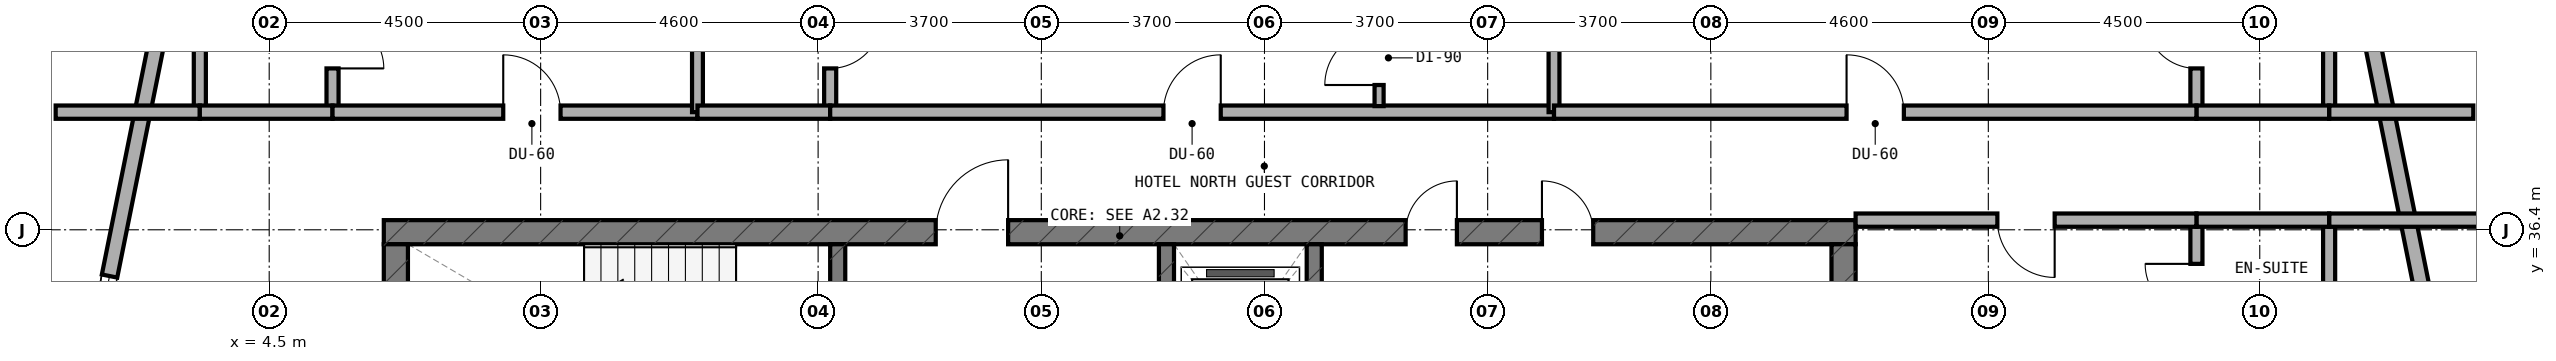
"""IFC4 building model, lengths in metres.
Left out: names, types, materials, properties, quantities, classifications, styles, units other than length and angle.
Written with IfcOpenShell. Run it as: python <this file> out.ifc"""

import sys

from ifc_helpers import new_model, si_unit, direction, frame, frame_2d, origin, place, context, subcontext, project, spatial, rectangle, extrude, element, fill, save


model = new_model("IFC4")
c1 = context("Model", 3, precision=1e-05, world=origin(), true_north=direction((0.0, 1.0)))
c2 = subcontext(c1, "Body", "Model", "MODEL_VIEW")
j1 = project(units=[si_unit("LENGTHUNIT", "METRE"), si_unit("PLANEANGLEUNIT", "RADIAN")], contexts=[c1])
p1 = place(None, origin())
s1 = spatial("IfcSite", under=j1, at=p1, CompositionType="ELEMENT")
p2 = place(p1, origin())
s2 = spatial("IfcBuilding", under=s1, at=p2, CompositionType="ELEMENT")
p3 = place(p2, frame((0.0, 0.0, 138.0)))
s3 = spatial("IfcBuildingStorey", under=s2, at=p3, CompositionType="ELEMENT", Elevation=138.0)
p4 = place(p3, frame((6.4, 36.36, 0.0), z_axis=(0.0, 0.0, 1.0), x_axis=(1.0, 0.0, 0.0)))
e1 = element("IfcWall", 1, at=p4, inside=s3, PredefinedType="SHEAR", context=c2, shape_type="SweptSolid", body=[
    extrude(rectangle(XDim=24.4, YDim=0.4, at=frame_2d((12.2, 0.0))), origin(), (0.0, 0.0, 1.0), 3.5),
])
p5 = place(p4, frame((9.15, 0.0, 0.0)))
e2 = element("IfcOpeningElement", 2, at=p5, cuts=e1, PredefinedType="OPENING", context=c2, shape_type="SweptSolid", body=[
    extrude(rectangle(XDim=1.2, YDim=2.15, at=frame_2d((0.6, 1.075))), frame((0.0, 0.21, 0.0), z_axis=(0.0, -1.0, 0.0), x_axis=(1.0, 0.0, 0.0)), (0.0, 0.0, 1.0), 0.42),
])
p6 = place(p4, frame((19.2, 0.0, 0.0)))
e3 = element("IfcOpeningElement", 3, at=p6, cuts=e1, PredefinedType="OPENING", context=c2, shape_type="SweptSolid", body=[
    extrude(rectangle(XDim=0.85, YDim=2.1, at=frame_2d((0.425, 1.05))), frame((0.0, 0.21, 0.0), z_axis=(0.0, -1.0, 0.0), x_axis=(1.0, 0.0, 0.0)), (0.0, 0.0, 1.0), 0.42),
])
p7 = place(p4, frame((16.94, 0.0, 0.0)))
e4 = element("IfcOpeningElement", 4, at=p7, cuts=e1, PredefinedType="OPENING", context=c2, shape_type="SweptSolid", body=[
    extrude(rectangle(XDim=0.85, YDim=2.1, at=frame_2d((0.425, 1.05))), frame((0.0, 0.21, 0.0), z_axis=(0.0, -1.0, 0.0), x_axis=(1.0, 0.0, 0.0)), (0.0, 0.0, 1.0), 0.42),
])
for number, where, z_axis, x_axis in (
    (5, (6.6, 33.0, 0.0), (0.0, 0.0, 1.0), (0.0, 1.0, 0.0)),
    (6, (30.6, 33.0, 0.0), (0.0, 0.0, 1.0), (0.0, 1.0, 0.0)),
):
    element("IfcWall", number, at=place(p3, frame(where, z_axis=z_axis, x_axis=x_axis)), inside=s3, PredefinedType="SHEAR", context=c2, shape_type="SweptSolid", body=[
        extrude(rectangle(XDim=3.16, YDim=0.4, at=frame_2d((1.58, 0.0))), origin(), (0.0, 0.0, 1.0), 3.5),
    ])
p8 = place(p3, frame((13.925, 33.0, 0.0), z_axis=(0.0, 0.0, 1.0), x_axis=(0.0, 1.0, 0.0)))
e7 = element("IfcWall", 7, at=p8, inside=s3, PredefinedType="STANDARD", context=c2, shape_type="SweptSolid", body=[
    extrude(rectangle(XDim=3.16, YDim=0.25, at=frame_2d((1.58, 0.0))), origin(), (0.0, 0.0, 1.0), 3.22),
])
p9 = place(p8, frame((0.98, 0.0, 0.0)))
e8 = element("IfcOpeningElement", 8, at=p9, cuts=e7, PredefinedType="OPENING", context=c2, shape_type="SweptSolid", body=[
    extrude(rectangle(XDim=1.1, YDim=2.15, at=frame_2d((0.55, 1.075))), frame((0.0, 0.135, 0.0), z_axis=(0.0, -1.0, 0.0), x_axis=(1.0, 0.0, 0.0)), (0.0, 0.0, 1.0), 0.27),
])
p10 = place(p3, frame((19.375, 33.0, 0.0), z_axis=(0.0, 0.0, 1.0), x_axis=(0.0, 1.0, 0.0)))
e9 = element("IfcWall", 9, at=p10, inside=s3, PredefinedType="STANDARD", context=c2, shape_type="SweptSolid", body=[
    extrude(rectangle(XDim=3.16, YDim=0.25, at=frame_2d((1.58, 0.0))), origin(), (0.0, 0.0, 1.0), 3.22),
])
p11 = place(p10, frame((0.98, 0.0, 0.0)))
e10 = element("IfcOpeningElement", 10, at=p11, cuts=e9, PredefinedType="OPENING", context=c2, shape_type="SweptSolid", body=[
    extrude(rectangle(XDim=1.1, YDim=2.15, at=frame_2d((0.55, 1.075))), frame((0.0, 0.135, 0.0), z_axis=(0.0, -1.0, 0.0), x_axis=(1.0, 0.0, 0.0)), (0.0, 0.0, 1.0), 0.27),
])
p12 = place(p3, frame((21.825, 33.0, 0.0), z_axis=(0.0, 0.0, 1.0), x_axis=(0.0, 1.0, 0.0)))
e11 = element("IfcWall", 11, at=p12, inside=s3, PredefinedType="STANDARD", context=c2, shape_type="SweptSolid", body=[
    extrude(rectangle(XDim=3.16, YDim=0.25, at=frame_2d((1.58, 0.0))), origin(), (0.0, 0.0, 1.0), 3.22),
])
p13 = place(p3, frame((41.084, 30.98, 0.0), z_axis=(0.0, 0.0, 1.0), x_axis=(-0.197435082048, 0.980315963543, 0.0)))
e12 = element("IfcWall", 12, at=p13, inside=s3, PredefinedType="STANDARD", context=c2, shape_type="SweptSolid", body=[
    extrude(rectangle(XDim=9.183, YDim=0.26, at=frame_2d((4.591, 0.0))), origin(), (0.0, 0.0, 1.0), 3.22),
])
p14 = place(p13, frame((1.734, 0.0, 0.85)))
e13 = element("IfcOpeningElement", 13, at=p14, cuts=e12, PredefinedType="OPENING", context=c2, shape_type="SweptSolid", body=[
    extrude(rectangle(XDim=2.1, YDim=1.5, at=frame_2d((1.05, 0.75))), frame((0.0, 0.14, 0.0), z_axis=(0.0, -1.0, 0.0), x_axis=(1.0, 0.0, 0.0)), (0.0, 0.0, 1.0), 0.28),
])
p15 = place(p3, frame((2.729, 39.982, 0.0), z_axis=(0.0, 0.0, 1.0), x_axis=(-0.197435082048, -0.980315963543, 0.0)))
e14 = element("IfcWall", 14, at=p15, inside=s3, PredefinedType="STANDARD", context=c2, shape_type="SweptSolid", body=[
    extrude(rectangle(XDim=9.183, YDim=0.26, at=frame_2d((4.591, 0.0))), origin(), (0.0, 0.0, 1.0), 3.22),
])
p16 = place(p15, frame((4.436, 0.0, 0.85)))
e15 = element("IfcOpeningElement", 15, at=p16, cuts=e14, PredefinedType="OPENING", context=c2, shape_type="SweptSolid", body=[
    extrude(rectangle(XDim=2.1, YDim=1.5, at=frame_2d((1.05, 0.75))), frame((0.0, 0.14, 0.0), z_axis=(0.0, -1.0, 0.0), x_axis=(1.0, 0.0, 0.0)), (0.0, 0.0, 1.0), 0.28),
])
p17 = place(p3, frame((5.55, 38.45, 0.0), z_axis=(0.0, 0.0, 1.0), x_axis=(0.0, 1.0, 0.0)))
e16 = element("IfcWall", 16, at=p17, inside=s3, PredefinedType="PLUMBINGWALL", context=c2, shape_type="SweptSolid", body=[
    extrude(rectangle(XDim=2.1, YDim=0.2, at=frame_2d((1.05, 0.0))), origin(), (0.0, 0.0, 1.0), 3.22),
])
p18 = place(p17, frame((0.625, 0.0, 0.0)))
e17 = element("IfcOpeningElement", 17, at=p18, cuts=e16, PredefinedType="OPENING", context=c2, shape_type="SweptSolid", body=[
    extrude(rectangle(XDim=0.85, YDim=2.1, at=frame_2d((0.425, 1.05))), frame((0.0, 0.11, 0.0), z_axis=(0.0, -1.0, 0.0), x_axis=(1.0, 0.0, 0.0)), (0.0, 0.0, 1.0), 0.22),
])
p19 = place(p3, frame((3.35, 38.45, 0.0), z_axis=(0.0, 0.0, 1.0), x_axis=(0.0, 1.0, 0.0)))
e18 = element("IfcWall", 18, at=p19, inside=s3, PredefinedType="PLUMBINGWALL", context=c2, shape_type="SweptSolid", body=[
    extrude(rectangle(XDim=2.1, YDim=0.2, at=frame_2d((1.05, 0.0))), origin(), (0.0, 0.0, 1.0), 3.22),
])
p20 = place(p3, frame((0.96, 38.35, 0.0), z_axis=(0.0, 0.0, 1.0), x_axis=(1.0, 0.0, 0.0)))
e19 = element("IfcWall", 19, at=p20, inside=s3, PredefinedType="SOLIDWALL", context=c2, shape_type="SweptSolid", body=[
    extrude(rectangle(XDim=2.39, YDim=0.22, at=frame_2d((1.195, 0.0))), origin(), (0.0, 0.0, 1.0), 3.22),
])
p21 = place(p3, frame((3.35, 38.35, 0.0), z_axis=(0.0, 0.0, 1.0), x_axis=(1.0, 0.0, 0.0)))
e20 = element("IfcWall", 20, at=p21, inside=s3, PredefinedType="SOLIDWALL", context=c2, shape_type="SweptSolid", body=[
    extrude(rectangle(XDim=2.2, YDim=0.22, at=frame_2d((1.1, 0.0))), origin(), (0.0, 0.0, 1.0), 3.22),
])
p22 = place(p3, frame((5.55, 38.35, 0.0), z_axis=(0.0, 0.0, 1.0), x_axis=(1.0, 0.0, 0.0)))
e21 = element("IfcWall", 21, at=p22, inside=s3, PredefinedType="SOLIDWALL", context=c2, shape_type="SweptSolid", body=[
    extrude(rectangle(XDim=6.05, YDim=0.22, at=frame_2d((3.025, 0.0))), origin(), (0.0, 0.0, 1.0), 2.695),
])
p23 = place(p22, frame((2.83, 0.0, 0.0)))
e22 = element("IfcOpeningElement", 22, at=p23, cuts=e21, PredefinedType="OPENING", context=c2, shape_type="SweptSolid", body=[
    extrude(rectangle(XDim=0.95, YDim=2.1, at=frame_2d((0.475, 1.05))), frame((0.0, 0.12, 0.0), z_axis=(0.0, -1.0, 0.0), x_axis=(1.0, 0.0, 0.0)), (0.0, 0.0, 1.0), 0.24),
])
p24 = place(p3, frame((11.6, 38.35, 0.0), z_axis=(0.0, 0.0, 1.0), x_axis=(0.0, 1.0, 0.0)))
e23 = element("IfcWall", 23, at=p24, inside=s3, PredefinedType="SOLIDWALL", context=c2, shape_type="SweptSolid", body=[
    extrude(rectangle(XDim=6.116, YDim=0.18, at=frame_2d((3.058, 0.0))), origin(), (0.0, 0.0, 1.0), 2.835),
])
p25 = place(p3, frame((13.8, 38.45, 0.0), z_axis=(0.0, 0.0, 1.0), x_axis=(0.0, 1.0, 0.0)))
e24 = element("IfcWall", 24, at=p25, inside=s3, PredefinedType="PLUMBINGWALL", context=c2, shape_type="SweptSolid", body=[
    extrude(rectangle(XDim=2.1, YDim=0.2, at=frame_2d((1.05, 0.0))), origin(), (0.0, 0.0, 1.0), 2.835),
])
p26 = place(p25, frame((0.625, 0.0, 0.0)))
e25 = element("IfcOpeningElement", 25, at=p26, cuts=e24, PredefinedType="OPENING", context=c2, shape_type="SweptSolid", body=[
    extrude(rectangle(XDim=0.85, YDim=2.1, at=frame_2d((0.425, 1.05))), frame((0.0, 0.11, 0.0), z_axis=(0.0, -1.0, 0.0), x_axis=(1.0, 0.0, 0.0)), (0.0, 0.0, 1.0), 0.22),
])
p27 = place(p3, frame((11.6, 38.35, 0.0), z_axis=(0.0, 0.0, 1.0), x_axis=(1.0, 0.0, 0.0)))
e26 = element("IfcWall", 26, at=p27, inside=s3, PredefinedType="SOLIDWALL", context=c2, shape_type="SweptSolid", body=[
    extrude(rectangle(XDim=2.2, YDim=0.22, at=frame_2d((1.1, 0.0))), origin(), (0.0, 0.0, 1.0), 3.22),
])
p28 = place(p3, frame((13.8, 38.35, 0.0), z_axis=(0.0, 0.0, 1.0), x_axis=(1.0, 0.0, 0.0)))
e27 = element("IfcWall", 27, at=p28, inside=s3, PredefinedType="SOLIDWALL", context=c2, shape_type="SweptSolid", body=[
    extrude(rectangle(XDim=12.0, YDim=0.22, at=frame_2d((6.0, 0.0))), origin(), (0.0, 0.0, 1.0), 2.695),
])
p29 = place(p28, frame((5.525, 0.0, 0.0)))
e28 = element("IfcOpeningElement", 28, at=p29, cuts=e27, PredefinedType="OPENING", context=c2, shape_type="SweptSolid", body=[
    extrude(rectangle(XDim=0.95, YDim=2.1, at=frame_2d((0.475, 1.05))), frame((0.0, 0.12, 0.0), z_axis=(0.0, -1.0, 0.0), x_axis=(1.0, 0.0, 0.0)), (0.0, 0.0, 1.0), 0.24),
])
p30 = place(p3, frame((22.9, 38.45, 0.0), z_axis=(0.0, 0.0, 1.0), x_axis=(0.0, 1.0, 0.0)))
e29 = element("IfcWall", 29, at=p30, inside=s3, PredefinedType="PARTITIONING", context=c2, shape_type="SweptSolid", body=[
    extrude(rectangle(XDim=6.59, YDim=0.15, at=frame_2d((3.295, 0.0))), origin(), (0.0, 0.0, 1.0), 2.835),
])
p31 = place(p30, frame((0.35, 0.0, 0.0)))
e30 = element("IfcOpeningElement", 30, at=p31, cuts=e29, PredefinedType="OPENING", context=c2, shape_type="SweptSolid", body=[
    extrude(rectangle(XDim=0.9, YDim=2.1, at=frame_2d((0.45, 1.05))), frame((0.0, 0.085, 0.0), z_axis=(0.0, -1.0, 0.0), x_axis=(1.0, 0.0, 0.0)), (0.0, 0.0, 1.0), 0.17),
])
p32 = place(p3, frame((25.8, 38.35, 0.0), z_axis=(0.0, 0.0, 1.0), x_axis=(0.0, 1.0, 0.0)))
e31 = element("IfcWall", 31, at=p32, inside=s3, PredefinedType="SOLIDWALL", context=c2, shape_type="SweptSolid", body=[
    extrude(rectangle(XDim=6.79, YDim=0.18, at=frame_2d((3.395, 0.0))), origin(), (0.0, 0.0, 1.0), 2.695),
])
p33 = place(p3, frame((36.45, 38.45, 0.0), z_axis=(0.0, 0.0, 1.0), x_axis=(0.0, 1.0, 0.0)))
e32 = element("IfcWall", 32, at=p33, inside=s3, PredefinedType="PLUMBINGWALL", context=c2, shape_type="SweptSolid", body=[
    extrude(rectangle(XDim=2.1, YDim=0.2, at=frame_2d((1.05, 0.0))), origin(), (0.0, 0.0, 1.0), 3.22),
])
p34 = place(p33, frame((0.625, 0.0, 0.0)))
e33 = element("IfcOpeningElement", 33, at=p34, cuts=e32, PredefinedType="OPENING", context=c2, shape_type="SweptSolid", body=[
    extrude(rectangle(XDim=0.85, YDim=2.1, at=frame_2d((0.425, 1.05))), frame((0.0, 0.11, 0.0), z_axis=(0.0, -1.0, 0.0), x_axis=(1.0, 0.0, 0.0)), (0.0, 0.0, 1.0), 0.22),
])
p35 = place(p3, frame((38.65, 38.45, 0.0), z_axis=(0.0, 0.0, 1.0), x_axis=(0.0, 1.0, 0.0)))
e34 = element("IfcWall", 34, at=p35, inside=s3, PredefinedType="PLUMBINGWALL", context=c2, shape_type="SweptSolid", body=[
    extrude(rectangle(XDim=2.1, YDim=0.2, at=frame_2d((1.05, 0.0))), origin(), (0.0, 0.0, 1.0), 3.22),
])
p36 = place(p3, frame((38.65, 38.35, 0.0), z_axis=(0.0, 0.0, 1.0), x_axis=(1.0, 0.0, 0.0)))
e35 = element("IfcWall", 35, at=p36, inside=s3, PredefinedType="SOLIDWALL", context=c2, shape_type="SweptSolid", body=[
    extrude(rectangle(XDim=2.39, YDim=0.22, at=frame_2d((1.195, 0.0))), origin(), (0.0, 0.0, 1.0), 3.22),
])
p37 = place(p3, frame((36.45, 38.35, 0.0), z_axis=(0.0, 0.0, 1.0), x_axis=(1.0, 0.0, 0.0)))
e36 = element("IfcWall", 36, at=p37, inside=s3, PredefinedType="SOLIDWALL", context=c2, shape_type="SweptSolid", body=[
    extrude(rectangle(XDim=2.2, YDim=0.22, at=frame_2d((1.1, 0.0))), origin(), (0.0, 0.0, 1.0), 3.22),
])
p38 = place(p3, frame((25.8, 38.35, 0.0), z_axis=(0.0, 0.0, 1.0), x_axis=(1.0, 0.0, 0.0)))
e37 = element("IfcWall", 37, at=p38, inside=s3, PredefinedType="SOLIDWALL", context=c2, shape_type="SweptSolid", body=[
    extrude(rectangle(XDim=10.65, YDim=0.22, at=frame_2d((5.325, 0.0))), origin(), (0.0, 0.0, 1.0), 2.695),
])
p39 = place(p38, frame((4.85, 0.0, 0.0)))
e38 = element("IfcOpeningElement", 38, at=p39, cuts=e37, PredefinedType="OPENING", context=c2, shape_type="SweptSolid", body=[
    extrude(rectangle(XDim=0.95, YDim=2.1, at=frame_2d((0.475, 1.05))), frame((0.0, 0.12, 0.0), z_axis=(0.0, -1.0, 0.0), x_axis=(1.0, 0.0, 0.0)), (0.0, 0.0, 1.0), 0.24),
])
p40 = place(p3, frame((36.45, 34.36, 0.0), z_axis=(0.0, 0.0, 1.0), x_axis=(0.0, 1.0, 0.0)))
e39 = element("IfcWall", 39, at=p40, inside=s3, PredefinedType="PLUMBINGWALL", context=c2, shape_type="SweptSolid", body=[
    extrude(rectangle(XDim=2.1, YDim=0.2, at=frame_2d((1.05, 0.0))), origin(), (0.0, 0.0, 1.0), 3.22),
])
p41 = place(p40, frame((0.625, 0.0, 0.0)))
e40 = element("IfcOpeningElement", 40, at=p41, cuts=e39, PredefinedType="OPENING", context=c2, shape_type="SweptSolid", body=[
    extrude(rectangle(XDim=0.85, YDim=2.1, at=frame_2d((0.425, 1.05))), frame((0.0, 0.11, 0.0), z_axis=(0.0, -1.0, 0.0), x_axis=(1.0, 0.0, 0.0)), (0.0, 0.0, 1.0), 0.22),
])
p42 = place(p3, frame((38.65, 34.36, 0.0), z_axis=(0.0, 0.0, 1.0), x_axis=(0.0, 1.0, 0.0)))
e41 = element("IfcWall", 41, at=p42, inside=s3, PredefinedType="PLUMBINGWALL", context=c2, shape_type="SweptSolid", body=[
    extrude(rectangle(XDim=2.1, YDim=0.2, at=frame_2d((1.05, 0.0))), origin(), (0.0, 0.0, 1.0), 3.22),
])
p43 = place(p3, frame((38.65, 36.56, 0.0), z_axis=(0.0, 0.0, 1.0), x_axis=(1.0, 0.0, 0.0)))
e42 = element("IfcWall", 42, at=p43, inside=s3, PredefinedType="SOLIDWALL", context=c2, shape_type="SweptSolid", body=[
    extrude(rectangle(XDim=2.55, YDim=0.22, at=frame_2d((1.275, 0.0))), origin(), (0.0, 0.0, 1.0), 3.22),
])
p44 = place(p3, frame((36.45, 36.56, 0.0), z_axis=(0.0, 0.0, 1.0), x_axis=(1.0, 0.0, 0.0)))
e43 = element("IfcWall", 43, at=p44, inside=s3, PredefinedType="SOLIDWALL", context=c2, shape_type="SweptSolid", body=[
    extrude(rectangle(XDim=2.2, YDim=0.22, at=frame_2d((1.1, 0.0))), origin(), (0.0, 0.0, 1.0), 3.22),
])
p45 = place(p3, frame((30.8, 36.56, 0.0), z_axis=(0.0, 0.0, 1.0), x_axis=(1.0, 0.0, 0.0)))
e44 = element("IfcWall", 44, at=p45, inside=s3, PredefinedType="SOLIDWALL", context=c2, shape_type="SweptSolid", body=[
    extrude(rectangle(XDim=5.65, YDim=0.22, at=frame_2d((2.825, 0.0))), origin(), (0.0, 0.0, 1.0), 2.695),
])
p46 = place(p45, frame((2.35, 0.0, 0.0)))
e45 = element("IfcOpeningElement", 45, at=p46, cuts=e44, PredefinedType="OPENING", context=c2, shape_type="SweptSolid", body=[
    extrude(rectangle(XDim=0.95, YDim=2.1, at=frame_2d((0.475, 1.05))), frame((0.0, 0.12, 0.0), z_axis=(0.0, -1.0, 0.0), x_axis=(1.0, 0.0, 0.0)), (0.0, 0.0, 1.0), 0.24),
])
p47 = place(p16, origin())
e46 = element("IfcWindow", 46, at=p47, inside=s3, PartitioningType="SINGLE_PANEL", PredefinedType="WINDOW", context=c2, shape_type="SweptSolid", body=[
    extrude(rectangle(XDim=2.1, YDim=1.5, at=frame_2d((1.05, 0.75))), frame((0.0, 0.03, 0.0), z_axis=(0.0, -1.0, 0.0), x_axis=(1.0, 0.0, 0.0)), (0.0, 0.0, 1.0), 0.06),
])
fill(e15, e46)
p48 = place(p5, origin())
e47 = element("IfcDoor", 47, at=p48, inside=s3, OperationType="SINGLE_SWING_RIGHT", PredefinedType="DOOR", context=c2, shape_type="SweptSolid", body=[
    extrude(rectangle(XDim=1.2, YDim=2.15, at=frame_2d((0.6, 1.075))), frame((0.0, 0.025, 0.0), z_axis=(0.0, -1.0, 0.0), x_axis=(1.0, 0.0, 0.0)), (0.0, 0.0, 1.0), 0.05),
])
fill(e2, e47)
p49 = place(p6, origin())
e48 = element("IfcDoor", 48, at=p49, inside=s3, OperationType="SINGLE_SWING_LEFT", PredefinedType="DOOR", context=c2, shape_type="SweptSolid", body=[
    extrude(rectangle(XDim=0.85, YDim=2.1, at=frame_2d((0.425, 1.05))), frame((0.0, 0.025, 0.0), z_axis=(0.0, -1.0, 0.0), x_axis=(1.0, 0.0, 0.0)), (0.0, 0.0, 1.0), 0.05),
])
fill(e3, e48)
p50 = place(p7, origin())
e49 = element("IfcDoor", 49, at=p50, inside=s3, OperationType="SINGLE_SWING_RIGHT", PredefinedType="DOOR", context=c2, shape_type="SweptSolid", body=[
    extrude(rectangle(XDim=0.85, YDim=2.1, at=frame_2d((0.425, 1.05))), frame((0.0, 0.025, 0.0), z_axis=(0.0, -1.0, 0.0), x_axis=(1.0, 0.0, 0.0)), (0.0, 0.0, 1.0), 0.05),
])
fill(e4, e49)
p51 = place(p18, frame((0.85, 0.0, 0.0), z_axis=(0.0, 0.0, 1.0), x_axis=(-1.0, 0.0, 0.0)))
e50 = element("IfcDoor", 50, at=p51, inside=s3, OperationType="SINGLE_SWING_RIGHT", PredefinedType="DOOR", context=c2, shape_type="SweptSolid", body=[
    extrude(rectangle(XDim=0.85, YDim=2.1, at=frame_2d((0.425, 1.05))), frame((0.0, 0.025, 0.0), z_axis=(0.0, -1.0, 0.0), x_axis=(1.0, 0.0, 0.0)), (0.0, 0.0, 1.0), 0.05),
])
fill(e17, e50)
p52 = place(p23, origin())
e51 = element("IfcDoor", 51, at=p52, inside=s3, OperationType="SINGLE_SWING_LEFT", PredefinedType="DOOR", context=c2, shape_type="SweptSolid", body=[
    extrude(rectangle(XDim=0.95, YDim=2.1, at=frame_2d((0.475, 1.05))), frame((0.0, 0.025, 0.0), z_axis=(0.0, -1.0, 0.0), x_axis=(1.0, 0.0, 0.0)), (0.0, 0.0, 1.0), 0.05),
])
fill(e22, e51)
p53 = place(p26, frame((0.85, 0.0, 0.0), z_axis=(0.0, 0.0, 1.0), x_axis=(-1.0, 0.0, 0.0)))
e52 = element("IfcDoor", 52, at=p53, inside=s3, OperationType="SINGLE_SWING_LEFT", PredefinedType="DOOR", context=c2, shape_type="SweptSolid", body=[
    extrude(rectangle(XDim=0.85, YDim=2.1, at=frame_2d((0.425, 1.05))), frame((0.0, 0.025, 0.0), z_axis=(0.0, -1.0, 0.0), x_axis=(1.0, 0.0, 0.0)), (0.0, 0.0, 1.0), 0.05),
])
fill(e25, e52)
p54 = place(p29, origin())
e53 = element("IfcDoor", 53, at=p54, inside=s3, OperationType="SINGLE_SWING_RIGHT", PredefinedType="DOOR", context=c2, shape_type="SweptSolid", body=[
    extrude(rectangle(XDim=0.95, YDim=2.1, at=frame_2d((0.475, 1.05))), frame((0.0, 0.025, 0.0), z_axis=(0.0, -1.0, 0.0), x_axis=(1.0, 0.0, 0.0)), (0.0, 0.0, 1.0), 0.05),
])
fill(e28, e53)
p55 = place(p31, origin())
e54 = element("IfcDoor", 54, at=p55, inside=s3, OperationType="SINGLE_SWING_LEFT", PredefinedType="DOOR", context=c2, shape_type="SweptSolid", body=[
    extrude(rectangle(XDim=0.9, YDim=2.1, at=frame_2d((0.45, 1.05))), frame((0.0, 0.025, 0.0), z_axis=(0.0, -1.0, 0.0), x_axis=(1.0, 0.0, 0.0)), (0.0, 0.0, 1.0), 0.05),
])
fill(e30, e54)
p56 = place(p34, origin())
e55 = element("IfcDoor", 55, at=p56, inside=s3, OperationType="SINGLE_SWING_RIGHT", PredefinedType="DOOR", context=c2, shape_type="SweptSolid", body=[
    extrude(rectangle(XDim=0.85, YDim=2.1, at=frame_2d((0.425, 1.05))), frame((0.0, 0.025, 0.0), z_axis=(0.0, -1.0, 0.0), x_axis=(1.0, 0.0, 0.0)), (0.0, 0.0, 1.0), 0.05),
])
fill(e33, e55)
p57 = place(p39, origin())
e56 = element("IfcDoor", 56, at=p57, inside=s3, OperationType="SINGLE_SWING_LEFT", PredefinedType="DOOR", context=c2, shape_type="SweptSolid", body=[
    extrude(rectangle(XDim=0.95, YDim=2.1, at=frame_2d((0.475, 1.05))), frame((0.0, 0.025, 0.0), z_axis=(0.0, -1.0, 0.0), x_axis=(1.0, 0.0, 0.0)), (0.0, 0.0, 1.0), 0.05),
])
fill(e38, e56)
p58 = place(p41, origin())
e57 = element("IfcDoor", 57, at=p58, inside=s3, OperationType="SINGLE_SWING_RIGHT", PredefinedType="DOOR", context=c2, shape_type="SweptSolid", body=[
    extrude(rectangle(XDim=0.85, YDim=2.1, at=frame_2d((0.425, 1.05))), frame((0.0, 0.025, 0.0), z_axis=(0.0, -1.0, 0.0), x_axis=(1.0, 0.0, 0.0)), (0.0, 0.0, 1.0), 0.05),
])
fill(e40, e57)
p59 = place(p46, frame((0.95, 0.0, 0.0), z_axis=(0.0, 0.0, 1.0), x_axis=(-1.0, 0.0, 0.0)))
e58 = element("IfcDoor", 58, at=p59, inside=s3, OperationType="SINGLE_SWING_LEFT", PredefinedType="DOOR", context=c2, shape_type="SweptSolid", body=[
    extrude(rectangle(XDim=0.95, YDim=2.1, at=frame_2d((0.475, 1.05))), frame((0.0, 0.025, 0.0), z_axis=(0.0, -1.0, 0.0), x_axis=(1.0, 0.0, 0.0)), (0.0, 0.0, 1.0), 0.05),
])
fill(e45, e58)
save(model, sys.argv[1])
